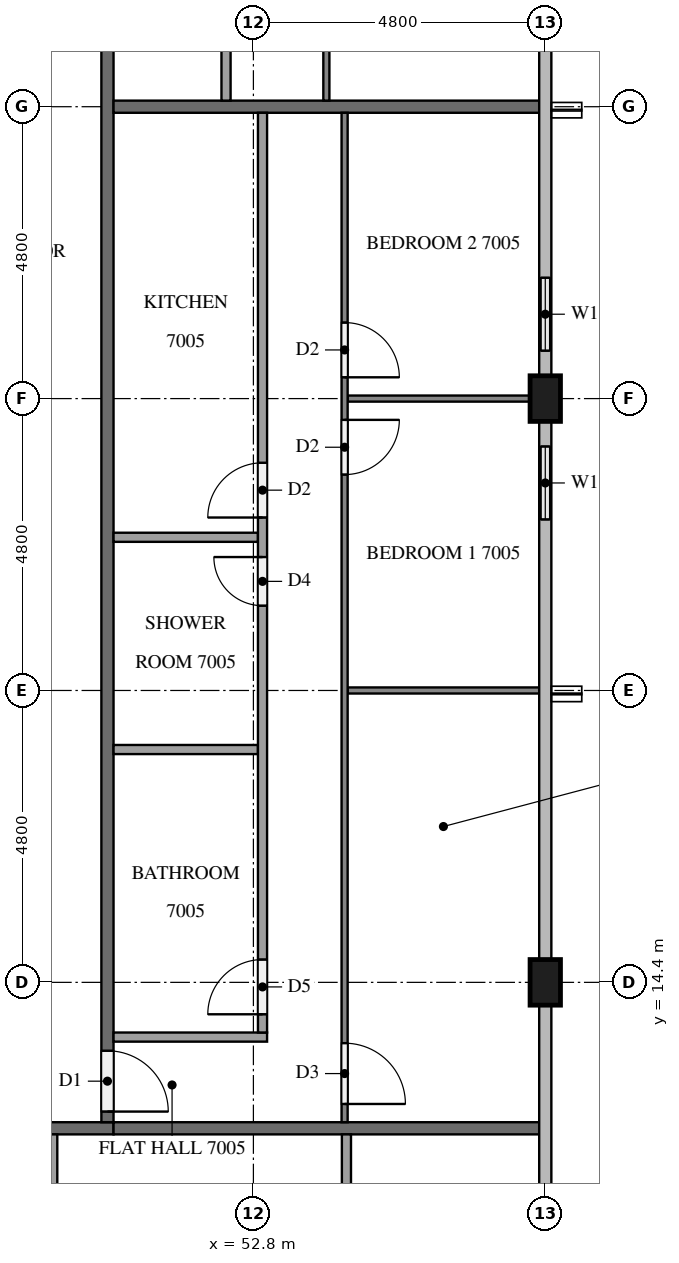
"""IFC4 building model, lengths in metres.
Left out: names, types, materials, properties, quantities, classifications, styles, units other than length and angle.
Written with IfcOpenShell. Run it as: python <this file> out.ifc"""

import sys

from ifc_helpers import new_model, si_unit, direction, frame, frame_2d, origin, origin_2d, place, context, subcontext, project, spatial, rectangle, extrude, element, fill, save


model = new_model("IFC4")
c1 = context("Model", 3, precision=1e-05, world=origin(), true_north=direction((0.0, 1.0)))
c2 = subcontext(c1, "Body", "Model", "MODEL_VIEW")
j1 = project(units=[si_unit("LENGTHUNIT", "METRE"), si_unit("PLANEANGLEUNIT", "RADIAN")], contexts=[c1])
p1 = place(None, origin())
s1 = spatial("IfcSite", under=j1, at=p1, CompositionType="ELEMENT")
p2 = place(p1, origin())
s2 = spatial("IfcBuilding", under=s1, at=p2, CompositionType="ELEMENT")
p3 = place(p2, frame((0.0, 0.0, 268.6)))
s3 = spatial("IfcBuildingStorey", under=s2, at=p3, CompositionType="ELEMENT", Elevation=268.6)
for number, where, z_axis, x_axis in (
    (1, (57.6, 14.4, 0.0), (0.0, 0.0, 1.0), (0.0, 1.0, 0.0)),
    (2, (57.6, 24.0, 0.0), (0.0, 0.0, 1.0), (0.0, 1.0, 0.0)),
):
    element("IfcColumn", number, at=place(p3, frame(where, z_axis=z_axis, x_axis=x_axis)), inside=s3, PredefinedType="COLUMN", context=c2, shape_type="SweptSolid", body=[
        extrude(rectangle(XDim=0.75, YDim=0.5, at=origin_2d()), origin(), (0.0, 0.0, 1.0), 3.2),
    ])
p4 = place(p3, frame((57.6, 21.6, 0.0), z_axis=(0.0, 0.0, 1.0), x_axis=(0.0, 1.0, 0.0)))
e3 = element("IfcWall", 3, at=p4, inside=s3, PredefinedType="SOLIDWALL", context=c2, shape_type="SweptSolid", body=[
    extrude(rectangle(XDim=2.025, YDim=0.15, at=frame_2d((1.012, 0.0))), origin(), (0.0, 0.0, 1.0), 3.2),
])
p5 = place(p4, frame((0.413, 0.0, 0.9)))
e4 = element("IfcOpeningElement", 4, at=p5, cuts=e3, PredefinedType="OPENING", context=c2, shape_type="SweptSolid", body=[
    extrude(rectangle(XDim=1.2, YDim=1.4, at=frame_2d((0.6, 0.7))), frame((0.0, 0.085, 0.0), z_axis=(0.0, -1.0, 0.0), x_axis=(1.0, 0.0, 0.0)), (0.0, 0.0, 1.0), 0.17),
])
p6 = place(p3, frame((57.6, 24.375, 0.0), z_axis=(0.0, 0.0, 1.0), x_axis=(0.0, 1.0, 0.0)))
e5 = element("IfcWall", 5, at=p6, inside=s3, PredefinedType="SOLIDWALL", context=c2, shape_type="SweptSolid", body=[
    extrude(rectangle(XDim=2.025, YDim=0.15, at=frame_2d((1.012, 0.0))), origin(), (0.0, 0.0, 1.0), 3.2),
])
p7 = place(p6, frame((0.413, 0.0, 0.9)))
e6 = element("IfcOpeningElement", 6, at=p7, cuts=e5, PredefinedType="OPENING", context=c2, shape_type="SweptSolid", body=[
    extrude(rectangle(XDim=1.2, YDim=1.4, at=frame_2d((0.6, 0.7))), frame((0.0, 0.085, 0.0), z_axis=(0.0, -1.0, 0.0), x_axis=(1.0, 0.0, 0.0)), (0.0, 0.0, 1.0), 0.17),
])
p8 = place(p3, frame((50.5, 12.0, 0.0), z_axis=(0.0, 0.0, 1.0), x_axis=(-1.0, 0.0, 0.0)))
e7 = element("IfcWall", 7, at=p8, inside=s3, PredefinedType="PARTITIONING", context=c2, shape_type="SweptSolid", body=[
    extrude(rectangle(XDim=38.6, YDim=0.2, at=frame_2d((19.3, 0.0))), origin(), (0.0, 0.0, 1.0), 3.2),
])
p9 = place(p8, frame((31.525, 0.0, 0.0)))
e8 = element("IfcOpeningElement", 8, at=p9, cuts=e7, PredefinedType="OPENING", context=c2, shape_type="SweptSolid", body=[
    extrude(rectangle(XDim=1.1, YDim=2.1, at=frame_2d((0.55, 1.05))), frame((0.0, 0.11, 0.0), z_axis=(0.0, -1.0, 0.0), x_axis=(1.0, 0.0, 0.0)), (0.0, 0.0, 1.0), 0.22),
])
p10 = place(p8, frame((19.575, 0.0, 0.0)))
e9 = element("IfcOpeningElement", 9, at=p10, cuts=e7, PredefinedType="OPENING", context=c2, shape_type="SweptSolid", body=[
    extrude(rectangle(XDim=1.0, YDim=2.1, at=frame_2d((0.5, 1.05))), frame((0.0, 0.11, 0.0), z_axis=(0.0, -1.0, 0.0), x_axis=(1.0, 0.0, 0.0)), (0.0, 0.0, 1.0), 0.22),
])
p11 = place(p8, frame((18.025, 0.0, 0.0)))
e10 = element("IfcOpeningElement", 10, at=p11, cuts=e7, PredefinedType="OPENING", context=c2, shape_type="SweptSolid", body=[
    extrude(rectangle(XDim=1.0, YDim=2.1, at=frame_2d((0.5, 1.05))), frame((0.0, 0.11, 0.0), z_axis=(0.0, -1.0, 0.0), x_axis=(1.0, 0.0, 0.0)), (0.0, 0.0, 1.0), 0.22),
])
p12 = place(p8, frame((1.225, 0.0, 0.0)))
e11 = element("IfcOpeningElement", 11, at=p12, cuts=e7, PredefinedType="OPENING", context=c2, shape_type="SweptSolid", body=[
    extrude(rectangle(XDim=1.0, YDim=2.1, at=frame_2d((0.5, 1.05))), frame((0.0, 0.11, 0.0), z_axis=(0.0, -1.0, 0.0), x_axis=(1.0, 0.0, 0.0)), (0.0, 0.0, 1.0), 0.22),
])
p13 = place(p3, frame((50.4, 40.7, 0.0), z_axis=(0.0, 0.0, 1.0), x_axis=(0.0, -1.0, 0.0)))
e12 = element("IfcWall", 12, at=p13, inside=s3, PredefinedType="PARTITIONING", context=c2, shape_type="SweptSolid", body=[
    extrude(rectangle(XDim=28.6, YDim=0.2, at=frame_2d((14.3, 0.0))), origin(), (0.0, 0.0, 1.0), 3.2),
])
p14 = place(p13, frame((27.425, 0.0, 0.0)))
e13 = element("IfcOpeningElement", 13, at=p14, cuts=e12, PredefinedType="OPENING", context=c2, shape_type="SweptSolid", body=[
    extrude(rectangle(XDim=1.0, YDim=2.1, at=frame_2d((0.5, 1.05))), frame((0.0, 0.11, 0.0), z_axis=(0.0, -1.0, 0.0), x_axis=(1.0, 0.0, 0.0)), (0.0, 0.0, 1.0), 0.22),
])
p15 = place(p13, frame((0.175, 0.0, 0.0)))
e14 = element("IfcOpeningElement", 14, at=p15, cuts=e12, PredefinedType="OPENING", context=c2, shape_type="SweptSolid", body=[
    extrude(rectangle(XDim=1.0, YDim=2.1, at=frame_2d((0.5, 1.05))), frame((0.0, 0.11, 0.0), z_axis=(0.0, -1.0, 0.0), x_axis=(1.0, 0.0, 0.0)), (0.0, 0.0, 1.0), 0.22),
])
for number, where, z_axis, x_axis in (
    (15, (50.5, 12.0, 0.0), (0.0, 0.0, 1.0), (1.0, 0.0, 0.0)),
    (16, (50.5, 28.8, 0.0), (0.0, 0.0, 1.0), (1.0, 0.0, 0.0)),
):
    element("IfcWall", number, at=place(p3, frame(where, z_axis=z_axis, x_axis=x_axis)), inside=s3, PredefinedType="PARTITIONING", context=c2, shape_type="SweptSolid", body=[
        extrude(rectangle(XDim=7.0, YDim=0.2, at=frame_2d((3.5, 0.0))), origin(), (0.0, 0.0, 1.0), 3.2),
    ])
p16 = place(p3, frame((54.33, 11.9, 0.0), z_axis=(0.0, 0.0, 1.0), x_axis=(0.0, -1.0, 0.0)))
e17 = element("IfcWall", 17, at=p16, inside=s3, PredefinedType="PARTITIONING", context=c2, shape_type="SweptSolid", body=[
    extrude(rectangle(XDim=2.975, YDim=0.15, at=frame_2d((1.487, 0.0))), origin(), (0.0, 0.0, 1.0), 3.2),
])
p17 = place(p3, frame((49.5, 11.9, 0.0), z_axis=(0.0, 0.0, 1.0), x_axis=(0.0, -1.0, 0.0)))
e18 = element("IfcWall", 18, at=p17, inside=s3, PredefinedType="PARTITIONING", context=c2, shape_type="SweptSolid", body=[
    extrude(rectangle(XDim=3.125, YDim=0.15, at=frame_2d((1.562, 0.0))), origin(), (0.0, 0.0, 1.0), 3.2),
])
p18 = place(p3, frame((54.35, 19.2, 0.0), z_axis=(0.0, 0.0, 1.0), x_axis=(1.0, 0.0, 0.0)))
e19 = element("IfcWall", 19, at=p18, inside=s3, PredefinedType="PARTITIONING", context=c2, shape_type="SweptSolid", body=[
    extrude(rectangle(XDim=3.15, YDim=0.1, at=frame_2d((1.575, 0.0))), origin(), (0.0, 0.0, 1.0), 3.2),
])
p19 = place(p3, frame((54.35, 24.0, 0.0), z_axis=(0.0, 0.0, 1.0), x_axis=(1.0, 0.0, 0.0)))
e20 = element("IfcWall", 20, at=p19, inside=s3, PredefinedType="PARTITIONING", context=c2, shape_type="SweptSolid", body=[
    extrude(rectangle(XDim=3.0, YDim=0.1, at=frame_2d((1.5, 0.0))), origin(), (0.0, 0.0, 1.0), 3.2),
])
p20 = place(p3, frame((54.3, 28.7, 0.0), z_axis=(0.0, 0.0, 1.0), x_axis=(0.0, -1.0, 0.0)))
e21 = element("IfcWall", 21, at=p20, inside=s3, PredefinedType="PARTITIONING", context=c2, shape_type="SweptSolid", body=[
    extrude(rectangle(XDim=16.6, YDim=0.1, at=frame_2d((8.3, 0.0))), origin(), (0.0, 0.0, 1.0), 3.2),
])
p21 = place(p20, frame((15.3, 0.0, 0.0)))
e22 = element("IfcOpeningElement", 22, at=p21, cuts=e21, PredefinedType="OPENING", context=c2, shape_type="SweptSolid", body=[
    extrude(rectangle(XDim=1.0, YDim=2.1, at=frame_2d((0.5, 1.05))), frame((0.0, 0.06, 0.0), z_axis=(0.0, -1.0, 0.0), x_axis=(1.0, 0.0, 0.0)), (0.0, 0.0, 1.0), 0.12),
])
p22 = place(p20, frame((5.05, 0.0, 0.0)))
e23 = element("IfcOpeningElement", 23, at=p22, cuts=e21, PredefinedType="OPENING", context=c2, shape_type="SweptSolid", body=[
    extrude(rectangle(XDim=0.9, YDim=2.1, at=frame_2d((0.45, 1.05))), frame((0.0, 0.06, 0.0), z_axis=(0.0, -1.0, 0.0), x_axis=(1.0, 0.0, 0.0)), (0.0, 0.0, 1.0), 0.12),
])
p23 = place(p20, frame((3.45, 0.0, 0.0)))
e24 = element("IfcOpeningElement", 24, at=p23, cuts=e21, PredefinedType="OPENING", context=c2, shape_type="SweptSolid", body=[
    extrude(rectangle(XDim=0.9, YDim=2.1, at=frame_2d((0.45, 1.05))), frame((0.0, 0.06, 0.0), z_axis=(0.0, -1.0, 0.0), x_axis=(1.0, 0.0, 0.0)), (0.0, 0.0, 1.0), 0.12),
])
for number, where, z_axis, x_axis in (
    (25, (50.5, 18.229, 0.0), (0.0, 0.0, 1.0), (1.0, 0.0, 0.0)),
    (26, (50.5, 21.719, 0.0), (0.0, 0.0, 1.0), (1.0, 0.0, 0.0)),
):
    element("IfcWall", number, at=place(p3, frame(where, z_axis=z_axis, x_axis=x_axis)), inside=s3, PredefinedType="PARTITIONING", context=c2, shape_type="SweptSolid", body=[
        extrude(rectangle(XDim=2.375, YDim=0.15, at=frame_2d((1.188, 0.0))), origin(), (0.0, 0.0, 1.0), 3.2),
    ])
p24 = place(p3, frame((50.5, 13.5, 0.0), z_axis=(0.0, 0.0, 1.0), x_axis=(1.0, 0.0, 0.0)))
e27 = element("IfcWall", 27, at=p24, inside=s3, PredefinedType="PARTITIONING", context=c2, shape_type="SweptSolid", body=[
    extrude(rectangle(XDim=2.525, YDim=0.15, at=frame_2d((1.262, 0.0))), origin(), (0.0, 0.0, 1.0), 3.2),
])
p25 = place(p3, frame((52.95, 13.575, 0.0), z_axis=(0.0, 0.0, 1.0), x_axis=(0.0, 1.0, 0.0)))
e28 = element("IfcWall", 28, at=p25, inside=s3, PredefinedType="PARTITIONING", context=c2, shape_type="SweptSolid", body=[
    extrude(rectangle(XDim=15.125, YDim=0.15, at=frame_2d((7.562, 0.0))), origin(), (0.0, 0.0, 1.0), 3.2),
])
p26 = place(p25, frame((0.3, 0.0, 0.0)))
e29 = element("IfcOpeningElement", 29, at=p26, cuts=e28, PredefinedType="OPENING", context=c2, shape_type="SweptSolid", body=[
    extrude(rectangle(XDim=0.9, YDim=2.1, at=frame_2d((0.45, 1.05))), frame((0.0, 0.085, 0.0), z_axis=(0.0, -1.0, 0.0), x_axis=(1.0, 0.0, 0.0)), (0.0, 0.0, 1.0), 0.17),
])
p27 = place(p25, frame((7.019, 0.0, 0.0)))
e30 = element("IfcOpeningElement", 30, at=p27, cuts=e28, PredefinedType="OPENING", context=c2, shape_type="SweptSolid", body=[
    extrude(rectangle(XDim=0.8, YDim=2.1, at=frame_2d((0.4, 1.05))), frame((0.0, 0.085, 0.0), z_axis=(0.0, -1.0, 0.0), x_axis=(1.0, 0.0, 0.0)), (0.0, 0.0, 1.0), 0.17),
])
p28 = place(p25, frame((8.469, 0.0, 0.0)))
e31 = element("IfcOpeningElement", 31, at=p28, cuts=e28, PredefinedType="OPENING", context=c2, shape_type="SweptSolid", body=[
    extrude(rectangle(XDim=0.9, YDim=2.1, at=frame_2d((0.45, 1.05))), frame((0.0, 0.085, 0.0), z_axis=(0.0, -1.0, 0.0), x_axis=(1.0, 0.0, 0.0)), (0.0, 0.0, 1.0), 0.17),
])
p29 = place(p3, frame((54.0, 40.7, 0.0), z_axis=(0.0, 0.0, 1.0), x_axis=(0.0, -1.0, 0.0)))
e32 = element("IfcWall", 32, at=p29, inside=s3, PredefinedType="PARTITIONING", context=c2, shape_type="SweptSolid", body=[
    extrude(rectangle(XDim=11.8, YDim=0.1, at=frame_2d((5.9, 0.0))), origin(), (0.0, 0.0, 1.0), 3.2),
])
p30 = place(p29, frame((5.75, 0.0, 0.0)))
e33 = element("IfcOpeningElement", 33, at=p30, cuts=e32, PredefinedType="OPENING", context=c2, shape_type="SweptSolid", body=[
    extrude(rectangle(XDim=1.0, YDim=2.1, at=frame_2d((0.5, 1.05))), frame((0.0, 0.06, 0.0), z_axis=(0.0, -1.0, 0.0), x_axis=(1.0, 0.0, 0.0)), (0.0, 0.0, 1.0), 0.12),
])
p31 = place(p29, frame((7.45, 0.0, 0.0)))
e34 = element("IfcOpeningElement", 34, at=p31, cuts=e32, PredefinedType="OPENING", context=c2, shape_type="SweptSolid", body=[
    extrude(rectangle(XDim=0.9, YDim=2.1, at=frame_2d((0.45, 1.05))), frame((0.0, 0.06, 0.0), z_axis=(0.0, -1.0, 0.0), x_axis=(1.0, 0.0, 0.0)), (0.0, 0.0, 1.0), 0.12),
])
p32 = place(p3, frame((52.35, 28.9, 0.0), z_axis=(0.0, 0.0, 1.0), x_axis=(0.0, 1.0, 0.0)))
e35 = element("IfcWall", 35, at=p32, inside=s3, PredefinedType="PARTITIONING", context=c2, shape_type="SweptSolid", body=[
    extrude(rectangle(XDim=10.325, YDim=0.15, at=frame_2d((5.163, 0.0))), origin(), (0.0, 0.0, 1.0), 3.2),
])
p33 = place(p32, frame((6.52, 0.0, 0.0)))
e36 = element("IfcOpeningElement", 36, at=p33, cuts=e35, PredefinedType="OPENING", context=c2, shape_type="SweptSolid", body=[
    extrude(rectangle(XDim=0.8, YDim=2.1, at=frame_2d((0.4, 1.05))), frame((0.0, 0.085, 0.0), z_axis=(0.0, -1.0, 0.0), x_axis=(1.0, 0.0, 0.0)), (0.0, 0.0, 1.0), 0.17),
])
p34 = place(p32, frame((4.97, 0.0, 0.0)))
e37 = element("IfcOpeningElement", 37, at=p34, cuts=e35, PredefinedType="OPENING", context=c2, shape_type="SweptSolid", body=[
    extrude(rectangle(XDim=0.9, YDim=2.1, at=frame_2d((0.45, 1.05))), frame((0.0, 0.085, 0.0), z_axis=(0.0, -1.0, 0.0), x_axis=(1.0, 0.0, 0.0)), (0.0, 0.0, 1.0), 0.17),
])
p35 = place(p5, origin())
e38 = element("IfcWindow", 38, at=p35, inside=s3, PartitioningType="SINGLE_PANEL", PredefinedType="WINDOW", context=c2, shape_type="SweptSolid", body=[
    extrude(rectangle(XDim=1.2, YDim=1.4, at=frame_2d((0.6, 0.7))), frame((0.0, 0.03, 0.0), z_axis=(0.0, -1.0, 0.0), x_axis=(1.0, 0.0, 0.0)), (0.0, 0.0, 1.0), 0.06),
])
fill(e4, e38)
p36 = place(p7, origin())
e39 = element("IfcWindow", 39, at=p36, inside=s3, PartitioningType="SINGLE_PANEL", PredefinedType="WINDOW", context=c2, shape_type="SweptSolid", body=[
    extrude(rectangle(XDim=1.2, YDim=1.4, at=frame_2d((0.6, 0.7))), frame((0.0, 0.03, 0.0), z_axis=(0.0, -1.0, 0.0), x_axis=(1.0, 0.0, 0.0)), (0.0, 0.0, 1.0), 0.06),
])
fill(e6, e39)
p37 = place(p14, origin())
e40 = element("IfcDoor", 40, at=p37, inside=s3, OperationType="SINGLE_SWING_RIGHT", PredefinedType="DOOR", context=c2, shape_type="SweptSolid", body=[
    extrude(rectangle(XDim=1.0, YDim=2.1, at=frame_2d((0.5, 1.05))), frame((0.0, 0.025, 0.0), z_axis=(0.0, -1.0, 0.0), x_axis=(1.0, 0.0, 0.0)), (0.0, 0.0, 1.0), 0.05),
])
fill(e13, e40)
p38 = place(p21, origin())
e41 = element("IfcDoor", 41, at=p38, inside=s3, OperationType="SINGLE_SWING_RIGHT", PredefinedType="DOOR", context=c2, shape_type="SweptSolid", body=[
    extrude(rectangle(XDim=1.0, YDim=2.1, at=frame_2d((0.5, 1.05))), frame((0.0, 0.025, 0.0), z_axis=(0.0, -1.0, 0.0), x_axis=(1.0, 0.0, 0.0)), (0.0, 0.0, 1.0), 0.05),
])
fill(e22, e41)
p39 = place(p22, origin())
e42 = element("IfcDoor", 42, at=p39, inside=s3, OperationType="SINGLE_SWING_LEFT", PredefinedType="DOOR", context=c2, shape_type="SweptSolid", body=[
    extrude(rectangle(XDim=0.9, YDim=2.1, at=frame_2d((0.45, 1.05))), frame((0.0, 0.025, 0.0), z_axis=(0.0, -1.0, 0.0), x_axis=(1.0, 0.0, 0.0)), (0.0, 0.0, 1.0), 0.05),
])
fill(e23, e42)
p40 = place(p23, origin())
e43 = element("IfcDoor", 43, at=p40, inside=s3, OperationType="SINGLE_SWING_RIGHT", PredefinedType="DOOR", context=c2, shape_type="SweptSolid", body=[
    extrude(rectangle(XDim=0.9, YDim=2.1, at=frame_2d((0.45, 1.05))), frame((0.0, 0.025, 0.0), z_axis=(0.0, -1.0, 0.0), x_axis=(1.0, 0.0, 0.0)), (0.0, 0.0, 1.0), 0.05),
])
fill(e24, e43)
p41 = place(p26, origin())
e44 = element("IfcDoor", 44, at=p41, inside=s3, OperationType="SINGLE_SWING_LEFT", PredefinedType="DOOR", context=c2, shape_type="SweptSolid", body=[
    extrude(rectangle(XDim=0.9, YDim=2.1, at=frame_2d((0.45, 1.05))), frame((0.0, 0.025, 0.0), z_axis=(0.0, -1.0, 0.0), x_axis=(1.0, 0.0, 0.0)), (0.0, 0.0, 1.0), 0.05),
])
fill(e29, e44)
p42 = place(p27, origin())
e45 = element("IfcDoor", 45, at=p42, inside=s3, OperationType="SINGLE_SWING_RIGHT", PredefinedType="DOOR", context=c2, shape_type="SweptSolid", body=[
    extrude(rectangle(XDim=0.8, YDim=2.1, at=frame_2d((0.4, 1.05))), frame((0.0, 0.025, 0.0), z_axis=(0.0, -1.0, 0.0), x_axis=(1.0, 0.0, 0.0)), (0.0, 0.0, 1.0), 0.05),
])
fill(e30, e45)
p43 = place(p28, origin())
e46 = element("IfcDoor", 46, at=p43, inside=s3, OperationType="SINGLE_SWING_LEFT", PredefinedType="DOOR", context=c2, shape_type="SweptSolid", body=[
    extrude(rectangle(XDim=0.9, YDim=2.1, at=frame_2d((0.45, 1.05))), frame((0.0, 0.025, 0.0), z_axis=(0.0, -1.0, 0.0), x_axis=(1.0, 0.0, 0.0)), (0.0, 0.0, 1.0), 0.05),
])
fill(e31, e46)
save(model, sys.argv[1])
